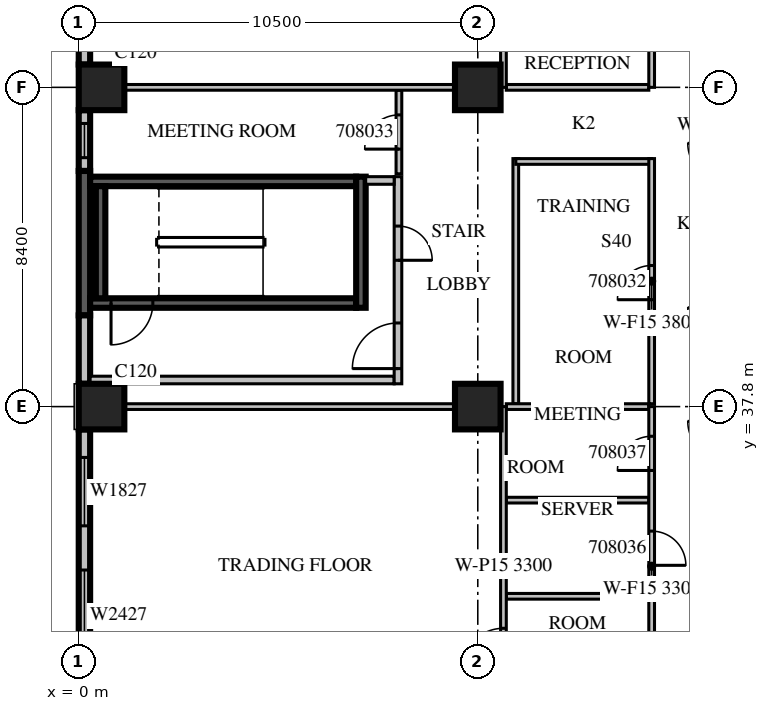
"""IFC4 building model, lengths in metres.
Left out: names, types, materials, properties, quantities, classifications, styles, units other than length and angle.
Written with IfcOpenShell. Run it as: python <this file> out.ifc"""

import sys

from ifc_helpers import new_model, si_unit, direction, frame, frame_2d, origin, origin_2d, place, context, subcontext, project, spatial, rectangle, extrude, source, transform, mapped, element, fill, save


model = new_model("IFC4")
c1 = context("Model", 3, precision=1e-05, world=origin(), true_north=direction((0.0, 1.0)))
c2 = subcontext(c1, "Body", "Model", "MODEL_VIEW")
j1 = project(units=[si_unit("LENGTHUNIT", "METRE"), si_unit("PLANEANGLEUNIT", "RADIAN")], contexts=[c1])
p1 = place(None, origin())
s1 = spatial("IfcSite", under=j1, at=p1, CompositionType="ELEMENT")
p2 = place(p1, origin())
s2 = spatial("IfcBuilding", under=s1, at=p2, CompositionType="ELEMENT")
p3 = place(p2, frame((0.0, 0.0, 44.7)))
s3 = spatial("IfcBuildingStorey", under=s2, at=p3, CompositionType="ELEMENT", Elevation=44.7)
m1 = source(origin(), c2, "Body", "SweptSolid", [
    extrude(rectangle(XDim=1.2, YDim=1.2, at=origin_2d()), origin(), (0.0, 0.0, 1.0), 4.2),
])
for number, where, z_axis, x_axis in (
    (1, (0.6, 37.8, 0.0), (0.0, 0.0, 1.0), (1.0, 0.0, 0.0)),
    (2, (10.5, 37.8, 0.0), (0.0, 0.0, 1.0), (1.0, 0.0, 0.0)),
    (3, (0.6, 46.2, 0.0), (0.0, 0.0, 1.0), (1.0, 0.0, 0.0)),
    (4, (10.5, 46.2, 0.0), (0.0, 0.0, 1.0), (1.0, 0.0, 0.0)),
):
    element("IfcColumn", number, at=place(p3, frame(where, z_axis=z_axis, x_axis=x_axis)), inside=s3, PredefinedType="COLUMN", context=c2, shape_type="MappedRepresentation", body=[
        mapped(m1, transform((0.0, 0.0, 0.0), scale=1.0)),
    ])
m2 = source(origin(), c2, "Body", "SweptSolid", [
    extrude(rectangle(XDim=4.68, YDim=0.3, at=frame_2d((2.34, 0.0))), origin(), (0.0, 0.0, 1.0), 3.8),
])
p4 = place(p3, frame((0.15, 51.48, 0.0), z_axis=(0.0, 0.0, 1.0), x_axis=(0.0, -1.0, 0.0)))
e5 = element("IfcWall", 5, at=p4, inside=s3, PredefinedType="STANDARD", context=c2, shape_type="MappedRepresentation", body=[
    mapped(m2, transform((0.0, 0.0, 0.0), scale=1.0)),
])
m3 = source(origin(), c2, "Body", "SweptSolid", [
    extrude(rectangle(XDim=1.6, YDim=0.3, at=frame_2d((0.8, 0.0))), origin(), (0.0, 0.0, 1.0), 3.8),
])
p5 = place(p3, frame((0.15, 45.6, 0.0), z_axis=(0.0, 0.0, 1.0), x_axis=(0.0, -1.0, 0.0)))
e6 = element("IfcWall", 6, at=p5, inside=s3, PredefinedType="STANDARD", context=c2, shape_type="MappedRepresentation", body=[
    mapped(m3, transform((0.0, 0.0, 0.0), scale=1.0)),
])
m4 = source(origin(), c2, "Body", "SweptSolid", [
    extrude(rectangle(XDim=0.9, YDim=2.7, at=frame_2d((0.45, 1.35))), frame((0.0, 0.16, 0.0), z_axis=(0.0, -1.0, 0.0), x_axis=(1.0, 0.0, 0.0)), (0.0, 0.0, 1.0), 0.32),
])
p6 = place(p5, frame((0.35, 0.0, 0.6)))
e7 = element("IfcOpeningElement", 7, at=p6, cuts=e6, PredefinedType="OPENING", context=c2, shape_type="MappedRepresentation", body=[
    mapped(m4, transform((0.0, 0.0, 0.0), scale=1.0)),
])
m5 = source(origin(), c2, "Body", "SweptSolid", [
    extrude(rectangle(XDim=3.8, YDim=0.3, at=frame_2d((1.9, 0.0))), origin(), (0.0, 0.0, 1.0), 3.8),
])
p7 = place(p3, frame((0.15, 44.0, 0.0), z_axis=(0.0, 0.0, 1.0), x_axis=(0.0, -1.0, 0.0)))
e8 = element("IfcWall", 8, at=p7, inside=s3, PredefinedType="SOLIDWALL", context=c2, shape_type="MappedRepresentation", body=[
    mapped(m5, transform((0.0, 0.0, 0.0), scale=1.0)),
])
m6 = source(origin(), c2, "Body", "SweptSolid", [
    extrude(rectangle(XDim=1.8, YDim=0.3, at=frame_2d((0.9, 0.0))), origin(), (0.0, 0.0, 1.0), 3.8),
])
p8 = place(p3, frame((0.15, 40.2, 0.0), z_axis=(0.0, 0.0, 1.0), x_axis=(0.0, -1.0, 0.0)))
e9 = element("IfcWall", 9, at=p8, inside=s3, PredefinedType="STANDARD", context=c2, shape_type="MappedRepresentation", body=[
    mapped(m6, transform((0.0, 0.0, 0.0), scale=1.0)),
])
m7 = source(origin(), c2, "Body", "SweptSolid", [
    extrude(rectangle(XDim=7.2, YDim=0.3, at=frame_2d((3.6, 0.0))), origin(), (0.0, 0.0, 1.0), 3.8),
])
p9 = place(p3, frame((0.15, 37.2, 0.0), z_axis=(0.0, 0.0, 1.0), x_axis=(0.0, -1.0, 0.0)))
e10 = element("IfcWall", 10, at=p9, inside=s3, PredefinedType="STANDARD", context=c2, shape_type="MappedRepresentation", body=[
    mapped(m7, transform((0.0, 0.0, 0.0), scale=1.0)),
])
m8 = source(origin(), c2, "Body", "SweptSolid", [
    extrude(rectangle(XDim=1.8, YDim=2.7, at=frame_2d((0.9, 1.35))), frame((0.0, 0.16, 0.0), z_axis=(0.0, -1.0, 0.0), x_axis=(1.0, 0.0, 0.0)), (0.0, 0.0, 1.0), 0.32),
])
p10 = place(p9, frame((0.738, 0.0, 0.6)))
e11 = element("IfcOpeningElement", 11, at=p10, cuts=e10, PredefinedType="OPENING", context=c2, shape_type="MappedRepresentation", body=[
    mapped(m8, transform((0.0, 0.0, 0.0), scale=1.0)),
])
m9 = source(origin(), c2, "Body", "SweptSolid", [
    extrude(rectangle(XDim=2.4, YDim=2.7, at=frame_2d((1.2, 1.35))), frame((0.0, 0.16, 0.0), z_axis=(0.0, -1.0, 0.0), x_axis=(1.0, 0.0, 0.0)), (0.0, 0.0, 1.0), 0.32),
])
p11 = place(p9, frame((3.7, 0.0, 0.6)))
e12 = element("IfcOpeningElement", 12, at=p11, cuts=e10, PredefinedType="OPENING", context=c2, shape_type="MappedRepresentation", body=[
    mapped(m9, transform((0.0, 0.0, 0.0), scale=1.0)),
])
m10 = source(origin(), c2, "Body", "SweptSolid", [
    extrude(rectangle(XDim=7.0, YDim=0.25, at=frame_2d((3.5, 0.0))), origin(), (0.0, 0.0, 1.0), 3.8),
])
p12 = place(p3, frame((0.3, 40.525, 0.0), z_axis=(0.0, 0.0, 1.0), x_axis=(1.0, 0.0, 0.0)))
e13 = element("IfcWall", 13, at=p12, inside=s3, PredefinedType="SOLIDWALL", context=c2, shape_type="MappedRepresentation", body=[
    mapped(m10, transform((0.0, 0.0, 0.0), scale=1.0)),
])
m11 = source(origin(), c2, "Body", "SweptSolid", [
    extrude(rectangle(XDim=1.1, YDim=2.1, at=frame_2d((0.55, 1.05))), frame((0.0, 0.135, 0.0), z_axis=(0.0, -1.0, 0.0), x_axis=(1.0, 0.0, 0.0)), (0.0, 0.0, 1.0), 0.27),
])
p13 = place(p12, frame((0.55, 0.0, 0.0)))
e14 = element("IfcOpeningElement", 14, at=p13, cuts=e13, PredefinedType="OPENING", context=c2, shape_type="MappedRepresentation", body=[
    mapped(m11, transform((0.0, 0.0, 0.0), scale=1.0)),
])
p14 = place(p3, frame((0.3, 43.725, 0.0), z_axis=(0.0, 0.0, 1.0), x_axis=(1.0, 0.0, 0.0)))
e15 = element("IfcWall", 15, at=p14, inside=s3, PredefinedType="SOLIDWALL", context=c2, shape_type="MappedRepresentation", body=[
    mapped(m10, transform((0.0, 0.0, 0.0), scale=1.0)),
])
m12 = source(origin(), c2, "Body", "SweptSolid", [
    extrude(rectangle(XDim=3.45, YDim=0.25, at=frame_2d((1.725, 0.0))), origin(), (0.0, 0.0, 1.0), 3.8),
])
p15 = place(p3, frame((7.425, 40.4, 0.0), z_axis=(0.0, 0.0, 1.0), x_axis=(0.0, 1.0, 0.0)))
e16 = element("IfcWall", 16, at=p15, inside=s3, PredefinedType="SOLIDWALL", context=c2, shape_type="MappedRepresentation", body=[
    mapped(m12, transform((0.0, 0.0, 0.0), scale=1.0)),
])
m13 = source(origin(), c2, "Body", "SweptSolid", [
    extrude(rectangle(XDim=2.95, YDim=0.25, at=frame_2d((1.475, 0.0))), origin(), (0.0, 0.0, 1.0), 3.8),
])
p16 = place(p3, frame((0.575, 40.65, 0.0), z_axis=(0.0, 0.0, 1.0), x_axis=(0.0, 1.0, 0.0)))
e17 = element("IfcWall", 17, at=p16, inside=s3, PredefinedType="SOLIDWALL", context=c2, shape_type="MappedRepresentation", body=[
    mapped(m13, transform((0.0, 0.0, 0.0), scale=1.0)),
])
m14 = source(origin(), c2, "Body", "SweptSolid", [
    extrude(rectangle(XDim=8.0, YDim=0.2, at=frame_2d((4.0, 0.0))), origin(), (0.0, 0.0, 1.0), 3.8),
])
p17 = place(p3, frame((0.3, 38.5, 0.0), z_axis=(0.0, 0.0, 1.0), x_axis=(1.0, 0.0, 0.0)))
e18 = element("IfcWall", 18, at=p17, inside=s3, PredefinedType="PARTITIONING", context=c2, shape_type="MappedRepresentation", body=[
    mapped(m14, transform((0.0, 0.0, 0.0), scale=1.0)),
])
m15 = source(origin(), c2, "Body", "SweptSolid", [
    extrude(rectangle(XDim=5.45, YDim=0.2, at=frame_2d((2.725, 0.0))), origin(), (0.0, 0.0, 1.0), 3.8),
])
p18 = place(p3, frame((8.4, 38.4, 0.0), z_axis=(0.0, 0.0, 1.0), x_axis=(0.0, 1.0, 0.0)))
e19 = element("IfcWall", 19, at=p18, inside=s3, PredefinedType="PARTITIONING", context=c2, shape_type="MappedRepresentation", body=[
    mapped(m15, transform((0.0, 0.0, 0.0), scale=1.0)),
])
m16 = source(origin(), c2, "Body", "SweptSolid", [
    extrude(rectangle(XDim=1.2, YDim=2.1, at=frame_2d((0.6, 1.05))), frame((0.0, 0.11, 0.0), z_axis=(0.0, -1.0, 0.0), x_axis=(1.0, 0.0, 0.0)), (0.0, 0.0, 1.0), 0.22),
])
p19 = place(p18, frame((0.4, 0.0, 0.0)))
e20 = element("IfcOpeningElement", 20, at=p19, cuts=e19, PredefinedType="OPENING", context=c2, shape_type="MappedRepresentation", body=[
    mapped(m16, transform((0.0, 0.0, 0.0), scale=1.0)),
])
m17 = source(origin(), c2, "Body", "SweptSolid", [
    extrude(rectangle(XDim=0.9, YDim=2.1, at=frame_2d((0.45, 1.05))), frame((0.0, 0.11, 0.0), z_axis=(0.0, -1.0, 0.0), x_axis=(1.0, 0.0, 0.0)), (0.0, 0.0, 1.0), 0.22),
])
p20 = place(p18, frame((3.25, 0.0, 0.0)))
e21 = element("IfcOpeningElement", 21, at=p20, cuts=e19, PredefinedType="OPENING", context=c2, shape_type="MappedRepresentation", body=[
    mapped(m17, transform((0.0, 0.0, 0.0), scale=1.0)),
])
m18 = source(origin(), c2, "Body", "SweptSolid", [
    extrude(rectangle(XDim=0.75, YDim=0.2, at=frame_2d((0.375, 0.0))), origin(), (0.0, 0.0, 1.0), 3.8),
])
p21 = place(p3, frame((7.55, 43.75, 0.0), z_axis=(0.0, 0.0, 1.0), x_axis=(1.0, 0.0, 0.0)))
e22 = element("IfcWall", 22, at=p21, inside=s3, PredefinedType="PARTITIONING", context=c2, shape_type="MappedRepresentation", body=[
    mapped(m18, transform((0.0, 0.0, 0.0), scale=1.0)),
])
m19 = source(origin(), c2, "Body", "SweptSolid", [
    extrude(rectangle(XDim=6.45, YDim=0.15, at=frame_2d((3.225, 0.0))), origin(), (0.0, 0.0, 1.0), 3.8),
])
p22 = place(p3, frame((11.5, 44.325, 0.0), z_axis=(0.0, 0.0, 1.0), x_axis=(0.0, -1.0, 0.0)))
e23 = element("IfcWall", 23, at=p22, inside=s3, PredefinedType="PARTITIONING", context=c2, shape_type="MappedRepresentation", body=[
    mapped(m19, transform((0.0, 0.0, 0.0), scale=1.0)),
])
m20 = source(origin(), c2, "Body", "SweptSolid", [
    extrude(rectangle(XDim=3.575, YDim=0.15, at=frame_2d((1.788, 0.0))), origin(), (0.0, 0.0, 1.0), 3.8),
])
p23 = place(p3, frame((15.075, 44.25, 0.0), z_axis=(0.0, 0.0, 1.0), x_axis=(-1.0, 0.0, 0.0)))
e24 = element("IfcWall", 24, at=p23, inside=s3, PredefinedType="PARTITIONING", context=c2, shape_type="MappedRepresentation", body=[
    mapped(m20, transform((0.0, 0.0, 0.0), scale=1.0)),
])
p24 = place(p3, frame((15.075, 37.875, 0.0), z_axis=(0.0, 0.0, 1.0), x_axis=(0.0, 1.0, 0.0)))
e25 = element("IfcWall", 25, at=p24, inside=s3, PredefinedType="PARTITIONING", context=c2, shape_type="MappedRepresentation", body=[
    mapped(m19, transform((0.0, 0.0, 0.0), scale=1.0)),
])
m21 = source(origin(), c2, "Body", "SweptSolid", [
    extrude(rectangle(XDim=0.9, YDim=2.1, at=frame_2d((0.45, 1.05))), frame((0.0, 0.085, 0.0), z_axis=(0.0, -1.0, 0.0), x_axis=(1.0, 0.0, 0.0)), (0.0, 0.0, 1.0), 0.17),
])
p25 = place(p24, frame((2.737, 0.0, 0.0)))
e26 = element("IfcOpeningElement", 26, at=p25, cuts=e25, PredefinedType="OPENING", context=c2, shape_type="MappedRepresentation", body=[
    mapped(m21, transform((0.0, 0.0, 0.0), scale=1.0)),
])
m22 = source(origin(), c2, "Body", "SweptSolid", [
    extrude(rectangle(XDim=2.2, YDim=0.15, at=frame_2d((1.1, 0.0))), origin(), (0.0, 0.0, 1.0), 3.8),
])
p26 = place(p3, frame((8.425, 43.925, 0.0), z_axis=(0.0, 0.0, 1.0), x_axis=(0.0, 1.0, 0.0)))
e27 = element("IfcWall", 27, at=p26, inside=s3, PredefinedType="PARTITIONING", context=c2, shape_type="MappedRepresentation", body=[
    mapped(m22, transform((0.0, 0.0, 0.0), scale=1.0)),
])
p27 = place(p26, frame((0.65, 0.0, 0.0)))
e28 = element("IfcOpeningElement", 28, at=p27, cuts=e27, PredefinedType="OPENING", context=c2, shape_type="MappedRepresentation", body=[
    mapped(m21, transform((0.0, 0.0, 0.0), scale=1.0)),
])
m23 = source(origin(), c2, "Body", "SweptSolid", [
    extrude(rectangle(XDim=3.75, YDim=0.15, at=frame_2d((1.875, 0.0))), origin(), (0.0, 0.0, 1.0), 3.8),
])
for number, where, z_axis, x_axis in (
    (29, (15.0, 32.809, 0.0), (0.0, 0.0, 1.0), (-1.0, 0.0, 0.0)),
    (30, (15.0, 35.339, 0.0), (0.0, 0.0, 1.0), (-1.0, 0.0, 0.0)),
):
    element("IfcWall", number, at=place(p3, frame(where, z_axis=z_axis, x_axis=x_axis)), inside=s3, PredefinedType="PARTITIONING", context=c2, shape_type="MappedRepresentation", body=[
        mapped(m23, transform((0.0, 0.0, 0.0), scale=1.0)),
    ])
m24 = source(origin(), c2, "Body", "SweptSolid", [
    extrude(rectangle(XDim=8.702, YDim=0.15, at=frame_2d((4.351, 0.0))), origin(), (0.0, 0.0, 1.0), 3.8),
])
p28 = place(p3, frame((9.901, 37.8, 0.0), z_axis=(0.0, 0.0, 1.0), x_axis=(-1.0, 0.0, 0.0)))
e31 = element("IfcWall", 31, at=p28, inside=s3, PredefinedType="PARTITIONING", context=c2, shape_type="MappedRepresentation", body=[
    mapped(m24, transform((0.0, 0.0, 0.0), scale=1.0)),
])
p29 = place(p3, frame((15.0, 37.8, 0.0), z_axis=(0.0, 0.0, 1.0), x_axis=(-1.0, 0.0, 0.0)))
e32 = element("IfcWall", 32, at=p29, inside=s3, PredefinedType="PARTITIONING", context=c2, shape_type="MappedRepresentation", body=[
    mapped(m23, transform((0.0, 0.0, 0.0), scale=1.0)),
])
p30 = place(p3, frame((11.175, 29.4, 0.0), z_axis=(0.0, 0.0, 1.0), x_axis=(0.0, 1.0, 0.0)))
e33 = element("IfcWall", 33, at=p30, inside=s3, PredefinedType="PARTITIONING", context=c2, shape_type="SweptSolid", body=[
    extrude(rectangle(XDim=8.4, YDim=0.15, at=frame_2d((4.2, 0.0))), origin(), (0.0, 0.0, 1.0), 3.3),
])
m25 = source(origin(), c2, "Body", "SweptSolid", [
    extrude(rectangle(XDim=1.1, YDim=2.1, at=frame_2d((0.55, 1.05))), frame((0.0, 0.085, 0.0), z_axis=(0.0, -1.0, 0.0), x_axis=(1.0, 0.0, 0.0)), (0.0, 0.0, 1.0), 0.17),
])
p31 = place(p30, frame((1.467, 0.0, 0.0)))
e34 = element("IfcOpeningElement", 34, at=p31, cuts=e33, PredefinedType="OPENING", context=c2, shape_type="MappedRepresentation", body=[
    mapped(m25, transform((0.0, 0.0, 0.0), scale=1.0)),
])
p32 = place(p3, frame((9.901, 46.2, 0.0), z_axis=(0.0, 0.0, 1.0), x_axis=(-1.0, 0.0, 0.0)))
e35 = element("IfcWall", 35, at=p32, inside=s3, PredefinedType="PARTITIONING", context=c2, shape_type="MappedRepresentation", body=[
    mapped(m24, transform((0.0, 0.0, 0.0), scale=1.0)),
])
p33 = place(p3, frame((15.0, 46.2, 0.0), z_axis=(0.0, 0.0, 1.0), x_axis=(-1.0, 0.0, 0.0)))
e36 = element("IfcWall", 36, at=p33, inside=s3, PredefinedType="PARTITIONING", context=c2, shape_type="MappedRepresentation", body=[
    mapped(m23, transform((0.0, 0.0, 0.0), scale=1.0)),
])
p34 = place(p3, frame((11.175, 46.2, 0.0), z_axis=(0.0, 0.0, 1.0), x_axis=(0.0, 1.0, 0.0)))
e37 = element("IfcWall", 37, at=p34, inside=s3, PredefinedType="PARTITIONING", context=c2, shape_type="SweptSolid", body=[
    extrude(rectangle(XDim=19.02, YDim=0.15, at=frame_2d((9.51, 0.0))), origin(), (0.0, 0.0, 1.0), 3.8),
])
p35 = place(p34, frame((1.46, 0.0, 0.0)))
e38 = element("IfcOpeningElement", 38, at=p35, cuts=e37, PredefinedType="OPENING", context=c2, shape_type="MappedRepresentation", body=[
    mapped(m25, transform((0.0, 0.0, 0.0), scale=1.0)),
])
m26 = source(origin(), c2, "Body", "SweptSolid", [
    extrude(rectangle(XDim=8.4, YDim=0.15, at=frame_2d((4.2, 0.0))), origin(), (0.0, 0.0, 1.0), 3.3),
])
p36 = place(p3, frame((15.075, 29.4, 0.0), z_axis=(0.0, 0.0, 1.0), x_axis=(0.0, 1.0, 0.0)))
e39 = element("IfcWall", 39, at=p36, inside=s3, PredefinedType="PARTITIONING", context=c2, shape_type="MappedRepresentation", body=[
    mapped(m26, transform((0.0, 0.0, 0.0), scale=1.0)),
])
p37 = place(p36, frame((1.154, 0.0, 0.0)))
e40 = element("IfcOpeningElement", 40, at=p37, cuts=e39, PredefinedType="OPENING", context=c2, shape_type="MappedRepresentation", body=[
    mapped(m25, transform((0.0, 0.0, 0.0), scale=1.0)),
])
p38 = place(p36, frame((4.224, 0.0, 0.0)))
e41 = element("IfcOpeningElement", 41, at=p38, cuts=e39, PredefinedType="OPENING", context=c2, shape_type="MappedRepresentation", body=[
    mapped(m21, transform((0.0, 0.0, 0.0), scale=1.0)),
])
p39 = place(p36, frame((6.719, 0.0, 0.0)))
e42 = element("IfcOpeningElement", 42, at=p39, cuts=e39, PredefinedType="OPENING", context=c2, shape_type="MappedRepresentation", body=[
    mapped(m21, transform((0.0, 0.0, 0.0), scale=1.0)),
])
m27 = source(origin(), c2, "Body", "SweptSolid", [
    extrude(rectangle(XDim=19.02, YDim=0.15, at=frame_2d((9.51, 0.0))), origin(), (0.0, 0.0, 1.0), 3.8),
])
p40 = place(p3, frame((15.075, 46.2, 0.0), z_axis=(0.0, 0.0, 1.0), x_axis=(0.0, 1.0, 0.0)))
e43 = element("IfcWall", 43, at=p40, inside=s3, PredefinedType="PARTITIONING", context=c2, shape_type="MappedRepresentation", body=[
    mapped(m27, transform((0.0, 0.0, 0.0), scale=1.0)),
])
p41 = place(p40, frame((1.148, 0.0, 0.0)))
e44 = element("IfcOpeningElement", 44, at=p41, cuts=e43, PredefinedType="OPENING", context=c2, shape_type="MappedRepresentation", body=[
    mapped(m25, transform((0.0, 0.0, 0.0), scale=1.0)),
])
p42 = place(p40, frame((4.234, 0.0, 0.0)))
e45 = element("IfcOpeningElement", 45, at=p42, cuts=e43, PredefinedType="OPENING", context=c2, shape_type="MappedRepresentation", body=[
    mapped(m21, transform((0.0, 0.0, 0.0), scale=1.0)),
])
p43 = place(p40, frame((6.738, 0.0, 0.0)))
e46 = element("IfcOpeningElement", 46, at=p43, cuts=e43, PredefinedType="OPENING", context=c2, shape_type="MappedRepresentation", body=[
    mapped(m21, transform((0.0, 0.0, 0.0), scale=1.0)),
])
p44 = place(p40, frame((8.92, 0.0, 0.0)))
e47 = element("IfcOpeningElement", 47, at=p44, cuts=e43, PredefinedType="OPENING", context=c2, shape_type="MappedRepresentation", body=[
    mapped(m21, transform((0.0, 0.0, 0.0), scale=1.0)),
])
p45 = place(p40, frame((10.598, 0.0, 0.0)))
e48 = element("IfcOpeningElement", 48, at=p45, cuts=e43, PredefinedType="OPENING", context=c2, shape_type="MappedRepresentation", body=[
    mapped(m21, transform((0.0, 0.0, 0.0), scale=1.0)),
])
p46 = place(p40, frame((17.097, 0.0, 0.0)))
e49 = element("IfcOpeningElement", 49, at=p46, cuts=e43, PredefinedType="OPENING", context=c2, shape_type="MappedRepresentation", body=[
    mapped(m25, transform((0.0, 0.0, 0.0), scale=1.0)),
])
p47 = place(p40, frame((13.529, 0.0, 0.0)))
e50 = element("IfcOpeningElement", 50, at=p47, cuts=e43, PredefinedType="OPENING", context=c2, shape_type="MappedRepresentation", body=[
    mapped(m21, transform((0.0, 0.0, 0.0), scale=1.0)),
])
m28 = source(origin(), c2, "Body", "SweptSolid", [
    extrude(rectangle(XDim=0.9, YDim=2.7, at=frame_2d((0.45, 1.35))), frame((0.0, 0.03, 0.0), z_axis=(0.0, -1.0, 0.0), x_axis=(1.0, 0.0, 0.0)), (0.0, 0.0, 1.0), 0.06),
])
p48 = place(p6, origin())
e51 = element("IfcWindow", 51, at=p48, inside=s3, PartitioningType="SINGLE_PANEL", PredefinedType="WINDOW", context=c2, shape_type="MappedRepresentation", body=[
    mapped(m28, transform((0.0, 0.0, 0.0), scale=1.0)),
])
fill(e7, e51)
m29 = source(origin(), c2, "Body", "SweptSolid", [
    extrude(rectangle(XDim=1.8, YDim=2.7, at=frame_2d((0.9, 1.35))), frame((0.0, 0.03, 0.0), z_axis=(0.0, -1.0, 0.0), x_axis=(1.0, 0.0, 0.0)), (0.0, 0.0, 1.0), 0.06),
])
p49 = place(p10, origin())
e52 = element("IfcWindow", 52, at=p49, inside=s3, PartitioningType="SINGLE_PANEL", PredefinedType="WINDOW", context=c2, shape_type="MappedRepresentation", body=[
    mapped(m29, transform((0.0, 0.0, 0.0), scale=1.0)),
])
fill(e11, e52)
m30 = source(origin(), c2, "Body", "SweptSolid", [
    extrude(rectangle(XDim=2.4, YDim=2.7, at=frame_2d((1.2, 1.35))), frame((0.0, 0.03, 0.0), z_axis=(0.0, -1.0, 0.0), x_axis=(1.0, 0.0, 0.0)), (0.0, 0.0, 1.0), 0.06),
])
p50 = place(p11, origin())
e53 = element("IfcWindow", 53, at=p50, inside=s3, PartitioningType="SINGLE_PANEL", PredefinedType="WINDOW", context=c2, shape_type="MappedRepresentation", body=[
    mapped(m30, transform((0.0, 0.0, 0.0), scale=1.0)),
])
fill(e12, e53)
m31 = source(origin(), c2, "Body", "SweptSolid", [
    extrude(rectangle(XDim=1.1, YDim=2.1, at=frame_2d((0.55, 1.05))), frame((0.0, 0.025, 0.0), z_axis=(0.0, -1.0, 0.0), x_axis=(1.0, 0.0, 0.0)), (0.0, 0.0, 1.0), 0.05),
])
p51 = place(p13, origin())
e54 = element("IfcDoor", 54, at=p51, inside=s3, OperationType="SINGLE_SWING_RIGHT", PredefinedType="DOOR", context=c2, shape_type="MappedRepresentation", body=[
    mapped(m31, transform((0.0, 0.0, 0.0), scale=1.0)),
])
fill(e14, e54)
m32 = source(origin(), c2, "Body", "SweptSolid", [
    extrude(rectangle(XDim=1.2, YDim=2.1, at=frame_2d((0.6, 1.05))), frame((0.0, 0.025, 0.0), z_axis=(0.0, -1.0, 0.0), x_axis=(1.0, 0.0, 0.0)), (0.0, 0.0, 1.0), 0.05),
])
p52 = place(p19, origin())
e55 = element("IfcDoor", 55, at=p52, inside=s3, OperationType="SINGLE_SWING_LEFT", PredefinedType="DOOR", context=c2, shape_type="MappedRepresentation", body=[
    mapped(m32, transform((0.0, 0.0, 0.0), scale=1.0)),
])
fill(e20, e55)
m33 = source(origin(), c2, "Body", "SweptSolid", [
    extrude(rectangle(XDim=0.9, YDim=2.1, at=frame_2d((0.45, 1.05))), frame((0.0, 0.025, 0.0), z_axis=(0.0, -1.0, 0.0), x_axis=(1.0, 0.0, 0.0)), (0.0, 0.0, 1.0), 0.05),
])
p53 = place(p20, origin())
e56 = element("IfcDoor", 56, at=p53, inside=s3, OperationType="SINGLE_SWING_RIGHT", PredefinedType="DOOR", context=c2, shape_type="MappedRepresentation", body=[
    mapped(m33, transform((0.0, 0.0, 0.0), scale=1.0)),
])
fill(e21, e56)
p54 = place(p25, origin())
e57 = element("IfcDoor", 57, at=p54, inside=s3, OperationType="SINGLE_SWING_LEFT", PredefinedType="DOOR", context=c2, shape_type="MappedRepresentation", body=[
    mapped(m33, transform((0.0, 0.0, 0.0), scale=1.0)),
])
fill(e26, e57)
p55 = place(p27, origin())
e58 = element("IfcDoor", 58, at=p55, inside=s3, OperationType="SINGLE_SWING_LEFT", PredefinedType="DOOR", context=c2, shape_type="MappedRepresentation", body=[
    mapped(m33, transform((0.0, 0.0, 0.0), scale=1.0)),
])
fill(e28, e58)
p56 = place(p31, origin())
e59 = element("IfcDoor", 59, at=p56, inside=s3, OperationType="SINGLE_SWING_LEFT", PredefinedType="DOOR", context=c2, shape_type="MappedRepresentation", body=[
    mapped(m31, transform((0.0, 0.0, 0.0), scale=1.0)),
])
fill(e34, e59)
p57 = place(p38, origin())
e60 = element("IfcDoor", 60, at=p57, inside=s3, OperationType="SINGLE_SWING_RIGHT", PredefinedType="DOOR", context=c2, shape_type="MappedRepresentation", body=[
    mapped(m33, transform((0.0, 0.0, 0.0), scale=1.0)),
])
fill(e41, e60)
p58 = place(p39, origin())
e61 = element("IfcDoor", 61, at=p58, inside=s3, OperationType="SINGLE_SWING_LEFT", PredefinedType="DOOR", context=c2, shape_type="MappedRepresentation", body=[
    mapped(m33, transform((0.0, 0.0, 0.0), scale=1.0)),
])
fill(e42, e61)
save(model, sys.argv[1])
